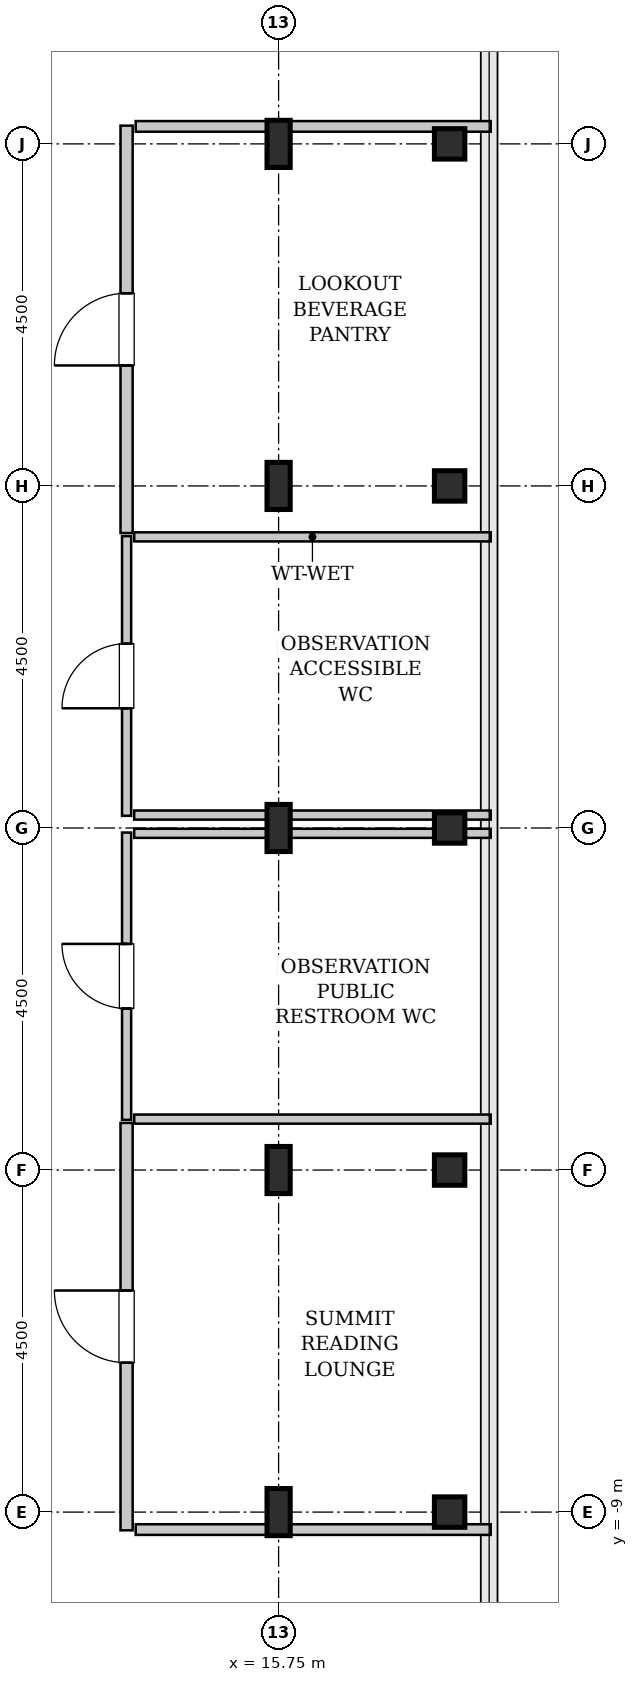
"""IFC4 building model, lengths in metres.
Left out: names, types, materials, properties, quantities, classifications, styles, units other than length and angle.
Written with IfcOpenShell. Run it as: python <this file> out.ifc"""

import sys

from ifc_helpers import new_model, si_unit, direction, frame, frame_2d, origin, origin_2d, place, context, subcontext, project, spatial, rectangle, hollow_rectangle, i_section, extrude, source, transform, mapped, element, fill, save


model = new_model("IFC4")
c1 = context("Model", 3, precision=1e-05, world=origin(), true_north=direction((0.0, 1.0)))
c2 = subcontext(c1, "Body", "Model", "MODEL_VIEW")
j1 = project(units=[si_unit("LENGTHUNIT", "METRE"), si_unit("PLANEANGLEUNIT", "RADIAN")], contexts=[c1])
p1 = place(None, origin())
s1 = spatial("IfcSite", under=j1, at=p1, CompositionType="ELEMENT")
p2 = place(p1, origin())
s2 = spatial("IfcBuilding", under=s1, at=p2, CompositionType="ELEMENT")
p3 = place(p2, frame((0.0, 0.0, 353.8)))
s3 = spatial("IfcBuildingStorey", under=s2, at=p3, CompositionType="ELEMENT", Elevation=353.8)
m1 = source(origin(), c2, "Body", "SweptSolid", [
    extrude(i_section(OverallWidth=0.305, OverallDepth=0.62, WebThickness=0.021, FlangeThickness=0.04, FilletRadius=0.027, at=origin_2d()), origin(), (0.0, 0.0, 1.0), 4.8),
])
for number, where, z_axis, x_axis in (
    (1, (15.75, -9.0, 0.0), (0.0, 0.0, 1.0), (1.0, 0.0, 0.0)),
    (2, (15.75, -4.5, 0.0), (0.0, 0.0, 1.0), (1.0, 0.0, 0.0)),
    (3, (15.75, 0.0, 0.0), (0.0, 0.0, 1.0), (1.0, 0.0, 0.0)),
    (4, (15.75, 4.5, 0.0), (0.0, 0.0, 1.0), (1.0, 0.0, 0.0)),
    (5, (15.75, 9.0, 0.0), (0.0, 0.0, 1.0), (1.0, 0.0, 0.0)),
):
    element("IfcColumn", number, at=place(p3, frame(where, z_axis=z_axis, x_axis=x_axis)), inside=s3, PredefinedType="COLUMN", context=c2, shape_type="MappedRepresentation", body=[
        mapped(m1, transform((0.0, 0.0, 0.0), x_axis=(1.0, 0.0, 0.0), y_axis=(0.0, 1.0, 0.0), z_axis=(0.0, 0.0, 1.0), scale=1.0)),
    ])
m2 = source(origin(), c2, "Body", "SweptSolid", [
    extrude(hollow_rectangle(XDim=0.4, YDim=0.4, WallThickness=0.02, InnerFilletRadius=0.02, OuterFilletRadius=0.04, at=origin_2d()), origin(), (0.0, 0.0, 1.0), 4.8),
])
for number, where, z_axis, x_axis in (
    (6, (18.0, -9.0, 0.0), (0.0, 0.0, 1.0), (1.0, 0.0, 0.0)),
    (7, (18.0, -4.5, 0.0), (0.0, 0.0, 1.0), (1.0, 0.0, 0.0)),
    (8, (18.0, 0.0, 0.0), (0.0, 0.0, 1.0), (1.0, 0.0, 0.0)),
    (9, (18.0, 4.5, 0.0), (0.0, 0.0, 1.0), (1.0, 0.0, 0.0)),
    (10, (18.0, 9.0, 0.0), (0.0, 0.0, 1.0), (1.0, 0.0, 0.0)),
):
    element("IfcColumn", number, at=place(p3, frame(where, z_axis=z_axis, x_axis=x_axis)), inside=s3, PredefinedType="COLUMN", context=c2, shape_type="MappedRepresentation", body=[
        mapped(m2, transform((0.0, 0.0, 0.0), x_axis=(1.0, 0.0, 0.0), y_axis=(0.0, 1.0, 0.0), z_axis=(0.0, 0.0, 1.0), scale=1.0)),
    ])
m3 = source(origin(), c2, "Body", "SweptSolid", [
    extrude(rectangle(XDim=3.68, YDim=0.12, at=frame_2d((1.84, 0.0))), origin(), (0.0, 0.0, 1.0), 4.485),
])
p4 = place(p3, frame((13.75, 0.16, 0.0), z_axis=(0.0, 0.0, 1.0), x_axis=(0.0, 1.0, 0.0)))
e11 = element("IfcWall", 11, at=p4, inside=s3, PredefinedType="PLUMBINGWALL", context=c2, shape_type="MappedRepresentation", body=[
    mapped(m3, transform((0.0, 0.0, 0.0), x_axis=(1.0, 0.0, 0.0), y_axis=(0.0, 1.0, 0.0), z_axis=(0.0, 0.0, 1.0), scale=1.0)),
])
p5 = place(p4, frame((1.415, 0.0, 0.0)))
e12 = element("IfcOpeningElement", 12, at=p5, cuts=e11, PredefinedType="OPENING", context=c2, shape_type="SweptSolid", body=[
    extrude(rectangle(XDim=0.85, YDim=2.1, at=frame_2d((0.425, 1.05))), frame((0.0, 0.07, 0.0), z_axis=(0.0, -1.0, 0.0), x_axis=(1.0, 0.0, 0.0)), (0.0, 0.0, 1.0), 0.14),
])
m4 = source(origin(), c2, "Body", "SweptSolid", [
    extrude(rectangle(XDim=4.69, YDim=0.12, at=frame_2d((2.345, 0.0))), origin(), (0.0, 0.0, 1.0), 4.485),
])
for number, where, z_axis, x_axis in (
    (13, (13.85, 3.83, 0.0), (0.0, 0.0, 1.0), (1.0, 0.0, 0.0)),
    (14, (13.85, 0.17, 0.0), (0.0, 0.0, 1.0), (1.0, 0.0, 0.0)),
):
    element("IfcWall", number, at=place(p3, frame(where, z_axis=z_axis, x_axis=x_axis)), inside=s3, PredefinedType="PLUMBINGWALL", context=c2, shape_type="MappedRepresentation", body=[
        mapped(m4, transform((0.0, 0.0, 0.0), x_axis=(1.0, 0.0, 0.0), y_axis=(0.0, 1.0, 0.0), z_axis=(0.0, 0.0, 1.0), scale=1.0)),
    ])
m5 = source(origin(), c2, "Body", "SweptSolid", [
    extrude(rectangle(XDim=3.78, YDim=0.12, at=frame_2d((1.89, 0.0))), origin(), (0.0, 0.0, 1.0), 4.485),
])
p6 = place(p3, frame((13.75, -3.84, 0.0), z_axis=(0.0, 0.0, 1.0), x_axis=(0.0, 1.0, 0.0)))
e15 = element("IfcWall", 15, at=p6, inside=s3, PredefinedType="PLUMBINGWALL", context=c2, shape_type="MappedRepresentation", body=[
    mapped(m5, transform((0.0, 0.0, 0.0), x_axis=(1.0, 0.0, 0.0), y_axis=(0.0, 1.0, 0.0), z_axis=(0.0, 0.0, 1.0), scale=1.0)),
])
p7 = place(p6, frame((1.465, 0.0, 0.0)))
e16 = element("IfcOpeningElement", 16, at=p7, cuts=e15, PredefinedType="OPENING", context=c2, shape_type="SweptSolid", body=[
    extrude(rectangle(XDim=0.85, YDim=2.1, at=frame_2d((0.425, 1.05))), frame((0.0, 0.07, 0.0), z_axis=(0.0, -1.0, 0.0), x_axis=(1.0, 0.0, 0.0)), (0.0, 0.0, 1.0), 0.14),
])
for number, where, z_axis, x_axis in (
    (17, (13.85, -0.07, 0.0), (0.0, 0.0, 1.0), (1.0, 0.0, 0.0)),
    (18, (13.85, -3.83, 0.0), (0.0, 0.0, 1.0), (1.0, 0.0, 0.0)),
):
    element("IfcWall", number, at=place(p3, frame(where, z_axis=z_axis, x_axis=x_axis)), inside=s3, PredefinedType="PLUMBINGWALL", context=c2, shape_type="MappedRepresentation", body=[
        mapped(m4, transform((0.0, 0.0, 0.0), x_axis=(1.0, 0.0, 0.0), y_axis=(0.0, 1.0, 0.0), z_axis=(0.0, 0.0, 1.0), scale=1.0)),
    ])
m6 = source(origin(), c2, "Body", "SweptSolid", [
    extrude(rectangle(XDim=5.36, YDim=0.16, at=frame_2d((2.68, 0.0))), origin(), (0.0, 0.0, 1.0), 4.485),
])
p8 = place(p3, frame((13.75, 3.88, 0.0), z_axis=(0.0, 0.0, 1.0), x_axis=(0.0, 1.0, 0.0)))
e19 = element("IfcWall", 19, at=p8, inside=s3, PredefinedType="PARTITIONING", context=c2, shape_type="MappedRepresentation", body=[
    mapped(m6, transform((0.0, 0.0, 0.0), x_axis=(1.0, 0.0, 0.0), y_axis=(0.0, 1.0, 0.0), z_axis=(0.0, 0.0, 1.0), scale=1.0)),
])
p9 = place(p8, frame((2.205, 0.0, 0.0)))
e20 = element("IfcOpeningElement", 20, at=p9, cuts=e19, PredefinedType="OPENING", context=c2, shape_type="SweptSolid", body=[
    extrude(rectangle(XDim=0.95, YDim=2.1, at=frame_2d((0.475, 1.05))), frame((0.0, 0.09, 0.0), z_axis=(0.0, -1.0, 0.0), x_axis=(1.0, 0.0, 0.0)), (0.0, 0.0, 1.0), 0.18),
])
m7 = source(origin(), c2, "Body", "SweptSolid", [
    extrude(rectangle(XDim=4.67, YDim=0.14, at=frame_2d((2.335, 0.0))), origin(), (0.0, 0.0, 1.0), 3.925),
])
p10 = place(p3, frame((13.87, 9.23, 0.0), z_axis=(0.0, 0.0, 1.0), x_axis=(1.0, 0.0, 0.0)))
e21 = element("IfcWall", 21, at=p10, inside=s3, PredefinedType="PARTITIONING", context=c2, shape_type="MappedRepresentation", body=[
    mapped(m7, transform((0.0, 0.0, 0.0), x_axis=(1.0, 0.0, 0.0), y_axis=(0.0, 1.0, 0.0), z_axis=(0.0, 0.0, 1.0), scale=1.0)),
])
p11 = place(p3, frame((13.75, -9.24, 0.0), z_axis=(0.0, 0.0, 1.0), x_axis=(0.0, 1.0, 0.0)))
e22 = element("IfcWall", 22, at=p11, inside=s3, PredefinedType="PARTITIONING", context=c2, shape_type="MappedRepresentation", body=[
    mapped(m6, transform((0.0, 0.0, 0.0), x_axis=(1.0, 0.0, 0.0), y_axis=(0.0, 1.0, 0.0), z_axis=(0.0, 0.0, 1.0), scale=1.0)),
])
p12 = place(p11, frame((2.205, 0.0, 0.0)))
e23 = element("IfcOpeningElement", 23, at=p12, cuts=e22, PredefinedType="OPENING", context=c2, shape_type="SweptSolid", body=[
    extrude(rectangle(XDim=0.95, YDim=2.1, at=frame_2d((0.475, 1.05))), frame((0.0, 0.09, 0.0), z_axis=(0.0, -1.0, 0.0), x_axis=(1.0, 0.0, 0.0)), (0.0, 0.0, 1.0), 0.18),
])
p13 = place(p3, frame((13.87, -9.23, 0.0), z_axis=(0.0, 0.0, 1.0), x_axis=(1.0, 0.0, 0.0)))
e24 = element("IfcWall", 24, at=p13, inside=s3, PredefinedType="PARTITIONING", context=c2, shape_type="MappedRepresentation", body=[
    mapped(m7, transform((0.0, 0.0, 0.0), x_axis=(1.0, 0.0, 0.0), y_axis=(0.0, 1.0, 0.0), z_axis=(0.0, 0.0, 1.0), scale=1.0)),
])
m8 = source(origin(), c2, "Body", "SweptSolid", [
    extrude(rectangle(XDim=0.85, YDim=2.1, at=frame_2d((0.425, 1.05))), frame((0.0, 0.025, 0.0), z_axis=(0.0, -1.0, 0.0), x_axis=(1.0, 0.0, 0.0)), (0.0, 0.0, 1.0), 0.05),
])
p14 = place(p5, origin())
e25 = element("IfcDoor", 25, at=p14, inside=s3, OperationType="SINGLE_SWING_LEFT", PredefinedType="DOOR", context=c2, shape_type="MappedRepresentation", body=[
    mapped(m8, transform((0.0, 0.0, 0.0), x_axis=(1.0, 0.0, 0.0), y_axis=(0.0, 1.0, 0.0), z_axis=(0.0, 0.0, 1.0), scale=1.0)),
])
fill(e12, e25)
p15 = place(p7, origin())
e26 = element("IfcDoor", 26, at=p15, inside=s3, OperationType="SINGLE_SWING_RIGHT", PredefinedType="DOOR", context=c2, shape_type="MappedRepresentation", body=[
    mapped(m8, transform((0.0, 0.0, 0.0), x_axis=(1.0, 0.0, 0.0), y_axis=(0.0, 1.0, 0.0), z_axis=(0.0, 0.0, 1.0), scale=1.0)),
])
fill(e16, e26)
m9 = source(origin(), c2, "Body", "SweptSolid", [
    extrude(rectangle(XDim=0.95, YDim=2.1, at=frame_2d((0.475, 1.05))), frame((0.0, 0.025, 0.0), z_axis=(0.0, -1.0, 0.0), x_axis=(1.0, 0.0, 0.0)), (0.0, 0.0, 1.0), 0.05),
])
p16 = place(p9, origin())
e27 = element("IfcDoor", 27, at=p16, inside=s3, OperationType="SINGLE_SWING_LEFT", PredefinedType="DOOR", context=c2, shape_type="MappedRepresentation", body=[
    mapped(m9, transform((0.0, 0.0, 0.0), x_axis=(1.0, 0.0, 0.0), y_axis=(0.0, 1.0, 0.0), z_axis=(0.0, 0.0, 1.0), scale=1.0)),
])
fill(e20, e27)
p17 = place(p12, origin())
e28 = element("IfcDoor", 28, at=p17, inside=s3, OperationType="SINGLE_SWING_RIGHT", PredefinedType="DOOR", context=c2, shape_type="MappedRepresentation", body=[
    mapped(m9, transform((0.0, 0.0, 0.0), x_axis=(1.0, 0.0, 0.0), y_axis=(0.0, 1.0, 0.0), z_axis=(0.0, 0.0, 1.0), scale=1.0)),
])
fill(e23, e28)
save(model, sys.argv[1])
